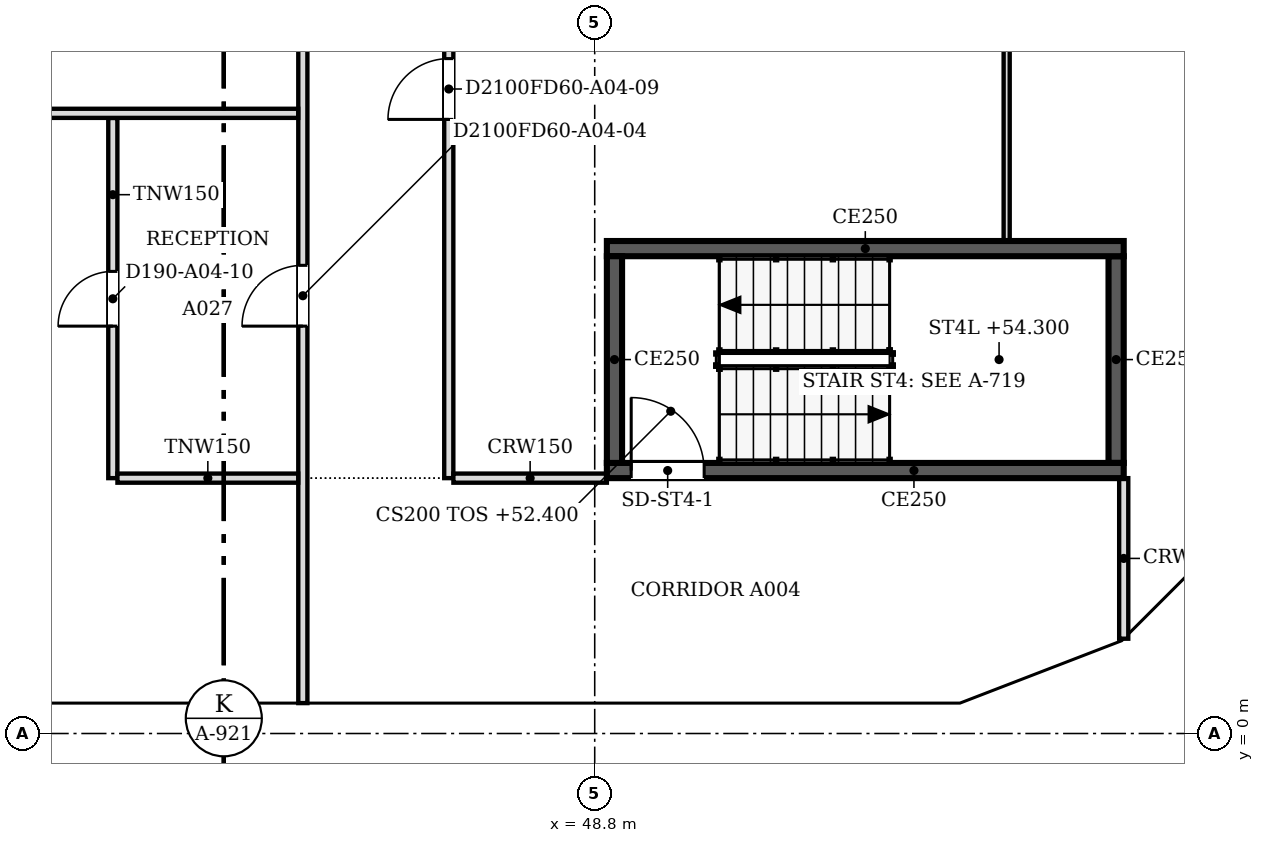
"""IFC4 building model, lengths in metres.
Left out: names, types, materials, properties, quantities, classifications, styles, units other than length and angle.
Written with IfcOpenShell. Run it as: python <this file> out.ifc"""

import sys

from ifc_helpers import new_model, si_unit, direction, frame, frame_2d, origin, place, context, subcontext, project, spatial, polyline, rectangle, outline, extrude, faceted_brep, source, transform, mapped, element, fill, save


model = new_model("IFC4")
c1 = context("Model", 3, precision=1e-05, world=origin(), true_north=direction((0.0, 1.0)))
c2 = subcontext(c1, "Body", "Model", "MODEL_VIEW")
j1 = project(units=[si_unit("LENGTHUNIT", "METRE"), si_unit("PLANEANGLEUNIT", "RADIAN")], contexts=[c1])
p1 = place(None, origin())
s1 = spatial("IfcSite", under=j1, at=p1, CompositionType="ELEMENT")
p2 = place(p1, origin())
s2 = spatial("IfcBuilding", under=s1, at=p2, CompositionType="ELEMENT")
p3 = place(p2, frame((0.0, 0.0, 52.4)))
s3 = spatial("IfcBuildingStorey", under=s2, at=p3, CompositionType="ELEMENT", Elevation=52.4)
m1 = source(origin(), c2, "Body", "Brep", [
    faceted_brep([(3.05, -0.25, 0.0), (6.1, -0.25, 3.8), (6.1, -0.25, 3.8), (3.05, -0.25, 7.6), (0.0, -0.25, 3.8), (0.0, 0.25, 3.8), (3.05, 0.25, 7.6), (6.1, 0.25, 3.8), (6.1, 0.25, 3.8), (3.05, 0.25, 0.0)], [[[0, 1, 2, 3, 4]], [[5, 6, 7, 8, 9]], [[9, 8, 1, 0]], [[7, 6, 3, 2]], [[6, 5, 4, 3]], [[5, 9, 0, 4]], [[1, 8, 7, 2]]]),
])
p4 = place(p3, frame((36.6, 0.25, -3.8), z_axis=(0.0, 0.0, 1.0), x_axis=(1.0, 0.0, 0.0)))
e1 = element("IfcWall", 1, at=p4, inside=s3, PredefinedType="SOLIDWALL", context=c2, shape_type="MappedRepresentation", body=[
    mapped(m1, transform((0.0, 0.0, 0.0), scale=1.0)),
])
m2 = source(origin(), c2, "Body", "SweptSolid", [
    extrude(outline(polyline([(3.05, 0.399), (5.78, 3.8), (3.05, 7.2), (0.321, 3.8), (3.05, 0.399)])), frame((0.0, 0.26, 0.0), z_axis=(0.0, -1.0, 0.0), x_axis=(1.0, 0.0, 0.0)), (0.0, 0.0, 1.0), 0.52),
])
p5 = place(p4, origin())
e2 = element("IfcOpeningElement", 2, at=p5, cuts=e1, PredefinedType="OPENING", context=c2, shape_type="MappedRepresentation", body=[
    mapped(m2, transform((0.0, 0.0, 0.0), scale=1.0)),
])
m3 = source(origin(), c2, "Body", "SweptSolid", [
    extrude(outline(polyline([(3.05, 0.0), (6.1, 3.8), (3.05, 7.6), (0.0, 3.8), (3.05, 0.0)])), frame((0.0, 0.25, 0.0), z_axis=(0.0, -1.0, 0.0), x_axis=(1.0, 0.0, 0.0)), (0.0, 0.0, 1.0), 0.5),
])
p6 = place(p3, frame((42.7, 0.25, -3.8), z_axis=(0.0, 0.0, 1.0), x_axis=(1.0, 0.0, 0.0)))
e3 = element("IfcWall", 3, at=p6, inside=s3, PredefinedType="SOLIDWALL", context=c2, shape_type="MappedRepresentation", body=[
    mapped(m3, transform((0.0, 0.0, 0.0), scale=1.0)),
])
p7 = place(p6, origin())
e4 = element("IfcOpeningElement", 4, at=p7, cuts=e3, PredefinedType="OPENING", context=c2, shape_type="MappedRepresentation", body=[
    mapped(m2, transform((0.0, 0.0, 0.0), scale=1.0)),
])
m4 = source(origin(), c2, "Body", "Brep", [
    faceted_brep([(3.05, -0.25, 0.0), (6.053, -0.25, 3.8), (3.05, -0.25, 7.6), (0.0, -0.25, 3.8), (0.0, 0.25, 3.8), (3.05, 0.25, 7.6), (6.007, 0.25, 3.859), (6.007, 0.25, 3.741), (3.05, 0.25, 0.0), (6.053, 0.0, 3.8)], [[[0, 1, 2, 3]], [[4, 5, 6, 7, 8]], [[8, 7, 9, 1, 0]], [[6, 5, 2, 1, 9]], [[5, 4, 3, 2]], [[4, 8, 0, 3]], [[9, 7, 6]]]),
])
p8 = place(p3, frame((48.8, 0.25, -3.8), z_axis=(0.0, 0.0, 1.0), x_axis=(1.0, 0.0, 0.0)))
e5 = element("IfcWall", 5, at=p8, inside=s3, PredefinedType="SOLIDWALL", context=c2, shape_type="MappedRepresentation", body=[
    mapped(m4, transform((0.0, 0.0, 0.0), scale=1.0)),
])
m5 = source(origin(), c2, "Body", "SweptSolid", [
    extrude(outline(polyline([(3.049, 0.401), (5.735, 3.8), (3.049, 7.199), (0.321, 3.8), (3.049, 0.401)])), frame((0.0, 0.26, 0.0), z_axis=(0.0, -1.0, 0.0), x_axis=(1.0, 0.0, 0.0)), (0.0, 0.0, 1.0), 0.52),
])
p9 = place(p8, origin())
e6 = element("IfcOpeningElement", 6, at=p9, cuts=e5, PredefinedType="OPENING", context=c2, shape_type="MappedRepresentation", body=[
    mapped(m5, transform((0.0, 0.0, 0.0), scale=1.0)),
])
m6 = source(origin(), c2, "Body", "Brep", [
    faceted_brep([(2.95, -0.25, 0.0), (3.003, -0.25, 0.068), (3.003, -0.25, 7.531), (2.95, -0.25, 7.6), (0.0, -0.25, 3.8), (0.047, 0.25, 3.86), (2.898, 0.25, 7.532), (2.898, 0.25, 0.068), (0.047, 0.25, 3.74), (2.95, 0.0, 0.0), (2.95, 0.0, 7.6), (0.0, 0.0, 3.8)], [[[0, 1, 2, 3, 4]], [[5, 6, 7, 8]], [[1, 0, 9]], [[10, 3, 2]], [[6, 5, 11, 4, 3, 10]], [[8, 7, 9, 0, 4, 11]], [[8, 11, 5]], [[1, 9, 7, 6, 10, 2]]]),
])
p10 = place(p3, frame((54.854, 0.25, -3.8), z_axis=(0.0, 0.0, 1.0), x_axis=(0.932970071518, 0.359953949349, 0.0)))
e7 = element("IfcWall", 7, at=p10, inside=s3, PredefinedType="SOLIDWALL", context=c2, shape_type="MappedRepresentation", body=[
    mapped(m6, transform((0.0, 0.0, 0.0), scale=1.0)),
])
m7 = source(origin(), c2, "Body", "SweptSolid", [
    extrude(outline(polyline([(2.75, 6.935), (0.316, 3.8), (2.75, 0.665), (2.75, 6.935)])), frame((0.0, 0.26, 0.0), z_axis=(0.0, -1.0, 0.0), x_axis=(1.0, 0.0, 0.0)), (0.0, 0.0, 1.0), 0.52),
])
p11 = place(p10, origin())
e8 = element("IfcOpeningElement", 8, at=p11, cuts=e7, PredefinedType="OPENING", context=c2, shape_type="MappedRepresentation", body=[
    mapped(m7, transform((0.0, 0.0, 0.0), scale=1.0)),
])
m8 = source(origin(), c2, "Body", "Brep", [
    faceted_brep([(0.053, -0.25, 0.0), (2.997, -0.25, 3.8), (0.053, -0.25, 7.6), (0.0, -0.25, 7.532), (0.0, -0.25, 0.068), (0.106, 0.25, 7.531), (2.944, 0.25, 3.868), (2.944, 0.25, 3.732), (0.106, 0.25, 0.068), (2.997, 0.0, 3.8), (0.053, 0.0, 0.0), (0.053, 0.0, 7.6)], [[[0, 1, 2, 3, 4]], [[5, 6, 7, 8]], [[8, 7, 9, 1, 0, 10]], [[6, 5, 11, 2, 1, 9]], [[3, 2, 11]], [[10, 0, 4]], [[8, 10, 4, 3, 11, 5]], [[9, 7, 6]]]),
])
p12 = place(p3, frame((57.569, 1.274, -3.8), z_axis=(0.0, 0.0, 1.0), x_axis=(0.707066050402, 0.707147509625, 0.0)))
e9 = element("IfcWall", 9, at=p12, inside=s3, PredefinedType="SOLIDWALL", context=c2, shape_type="MappedRepresentation", body=[
    mapped(m8, transform((0.0, 0.0, 0.0), scale=1.0)),
])
m9 = source(origin(), c2, "Body", "SweptSolid", [
    extrude(outline(polyline([(0.253, 0.666), (2.681, 3.8), (0.253, 6.934), (0.253, 0.666)])), frame((0.0, 0.26, 0.0), z_axis=(0.0, -1.0, 0.0), x_axis=(1.0, 0.0, 0.0)), (0.0, 0.0, 1.0), 0.52),
])
p13 = place(p12, origin())
e10 = element("IfcOpeningElement", 10, at=p13, cuts=e9, PredefinedType="OPENING", context=c2, shape_type="MappedRepresentation", body=[
    mapped(m9, transform((0.0, 0.0, 0.0), scale=1.0)),
])
p14 = place(p2, frame((0.0, 0.0, 56.2)))
s4 = spatial("IfcBuildingStorey", under=s2, at=p14, CompositionType="ELEMENT", Elevation=56.2)
m10 = source(origin(), c2, "Body", "SweptSolid", [
    extrude(outline(polyline([(3.05, 0.0), (6.1, 3.8), (3.05, 7.6), (0.0, 3.8), (3.05, 0.0)])), frame((0.0, 0.25, 0.0), z_axis=(0.0, -1.0, 0.0), x_axis=(1.0, 0.0, 0.0)), (0.0, 0.0, 1.0), 0.5),
])
p15 = place(p14, frame((39.65, 0.25, -3.8), z_axis=(0.0, 0.0, 1.0), x_axis=(1.0, 0.0, 0.0)))
e11 = element("IfcWall", 11, at=p15, inside=s4, PredefinedType="SOLIDWALL", context=c2, shape_type="MappedRepresentation", body=[
    mapped(m10, transform((0.0, 0.0, 0.0), scale=1.0)),
])
m11 = source(origin(), c2, "Body", "SweptSolid", [
    extrude(outline(polyline([(3.05, 0.399), (5.78, 3.8), (3.05, 7.201), (0.321, 3.8), (3.05, 0.399)])), frame((0.0, 0.26, 0.0), z_axis=(0.0, -1.0, 0.0), x_axis=(1.0, 0.0, 0.0)), (0.0, 0.0, 1.0), 0.52),
])
p16 = place(p15, origin())
e12 = element("IfcOpeningElement", 12, at=p16, cuts=e11, PredefinedType="OPENING", context=c2, shape_type="MappedRepresentation", body=[
    mapped(m11, transform((0.0, 0.0, 0.0), scale=1.0)),
])
p17 = place(p14, frame((45.75, 0.25, -3.8), z_axis=(0.0, 0.0, 1.0), x_axis=(1.0, 0.0, 0.0)))
e13 = element("IfcWall", 13, at=p17, inside=s4, PredefinedType="SOLIDWALL", context=c2, shape_type="MappedRepresentation", body=[
    mapped(m10, transform((0.0, 0.0, 0.0), scale=1.0)),
])
p18 = place(p17, origin())
e14 = element("IfcOpeningElement", 14, at=p18, cuts=e13, PredefinedType="OPENING", context=c2, shape_type="MappedRepresentation", body=[
    mapped(m11, transform((0.0, 0.0, 0.0), scale=1.0)),
])
m12 = source(origin(), c2, "Body", "Brep", [
    faceted_brep([(3.003, -0.25, 0.0), (3.05, -0.25, 0.06), (3.05, -0.25, 7.54), (3.003, -0.25, 7.6), (0.0, -0.25, 3.8), (0.0, 0.25, 3.8), (2.957, 0.25, 7.541), (2.957, 0.25, 0.059), (3.003, 0.0, 0.0), (3.003, 0.0, 7.6)], [[[0, 1, 2, 3, 4]], [[5, 6, 7]], [[1, 0, 8]], [[9, 3, 2]], [[6, 5, 4, 3, 9]], [[5, 7, 8, 0, 4]], [[1, 8, 7, 6, 9, 2]]]),
])
p19 = place(p14, frame((51.85, 0.25, -3.8), z_axis=(0.0, 0.0, 1.0), x_axis=(1.0, 0.0, 0.0)))
e15 = element("IfcWall", 15, at=p19, inside=s4, PredefinedType="SOLIDWALL", context=c2, shape_type="MappedRepresentation", body=[
    mapped(m12, transform((0.0, 0.0, 0.0), scale=1.0)),
])
m13 = source(origin(), c2, "Body", "SweptSolid", [
    extrude(outline(polyline([(2.803, 6.944), (0.319, 3.8), (2.803, 0.656), (2.803, 6.944)])), frame((0.0, 0.26, 0.0), z_axis=(0.0, -1.0, 0.0), x_axis=(1.0, 0.0, 0.0)), (0.0, 0.0, 1.0), 0.52),
])
p20 = place(p19, origin())
e16 = element("IfcOpeningElement", 16, at=p20, cuts=e15, PredefinedType="OPENING", context=c2, shape_type="MappedRepresentation", body=[
    mapped(m13, transform((0.0, 0.0, 0.0), scale=1.0)),
])
m14 = source(origin(), c2, "Body", "Brep", [
    faceted_brep([(0.047, -0.25, 0.0), (2.997, -0.25, 3.8), (0.047, -0.25, 7.6), (0.0, -0.25, 7.541), (0.0, -0.25, 0.059), (0.093, 0.25, 7.54), (2.944, 0.25, 3.868), (2.944, 0.25, 3.732), (0.093, 0.25, 0.06), (2.997, 0.0, 3.8), (0.047, 0.0, 0.0), (0.047, 0.0, 7.6)], [[[0, 1, 2, 3, 4]], [[5, 6, 7, 8]], [[8, 7, 9, 1, 0, 10]], [[6, 5, 11, 2, 1, 9]], [[3, 2, 11]], [[10, 0, 4]], [[8, 10, 4, 3, 11, 5]], [[9, 7, 6]]]),
])
p21 = place(p14, frame((54.81, 0.233, -3.8), z_axis=(0.0, 0.0, 1.0), x_axis=(0.932990326376, 0.359901446078, 0.0)))
e17 = element("IfcWall", 17, at=p21, inside=s4, PredefinedType="SOLIDWALL", context=c2, shape_type="MappedRepresentation", body=[
    mapped(m14, transform((0.0, 0.0, 0.0), scale=1.0)),
])
m15 = source(origin(), c2, "Body", "SweptSolid", [
    extrude(outline(polyline([(0.247, 0.665), (2.681, 3.8), (0.247, 6.935), (0.247, 0.665)])), frame((0.0, 0.26, 0.0), z_axis=(0.0, -1.0, 0.0), x_axis=(1.0, 0.0, 0.0)), (0.0, 0.0, 1.0), 0.52),
])
p22 = place(p21, origin())
e18 = element("IfcOpeningElement", 18, at=p22, cuts=e17, PredefinedType="OPENING", context=c2, shape_type="MappedRepresentation", body=[
    mapped(m15, transform((0.0, 0.0, 0.0), scale=1.0)),
])
m16 = source(origin(), c2, "Body", "Brep", [
    faceted_brep([(2.944, -0.25, 0.0), (2.997, -0.25, 0.068), (2.997, -0.25, 7.532), (2.944, -0.25, 7.6), (0.0, -0.25, 3.8), (0.053, 0.25, 3.868), (2.891, 0.25, 7.532), (2.891, 0.25, 0.068), (0.053, 0.25, 3.732), (2.944, 0.0, 0.0), (2.944, 0.0, 7.6), (0.0, 0.0, 3.8)], [[[0, 1, 2, 3, 4]], [[5, 6, 7, 8]], [[1, 0, 9]], [[10, 3, 2]], [[6, 5, 11, 4, 3, 10]], [[8, 7, 9, 0, 4, 11]], [[8, 11, 5]], [[1, 9, 7, 6, 10, 2]]]),
])
p23 = place(p14, frame((57.606, 1.312, -3.8), z_axis=(0.0, 0.0, 1.0), x_axis=(0.707147509625, 0.707066050402, 0.0)))
e19 = element("IfcWall", 19, at=p23, inside=s4, PredefinedType="SOLIDWALL", context=c2, shape_type="MappedRepresentation", body=[
    mapped(m16, transform((0.0, 0.0, 0.0), scale=1.0)),
])
m17 = source(origin(), c2, "Body", "SweptSolid", [
    extrude(outline(polyline([(2.744, 6.934), (0.316, 3.8), (2.744, 0.667), (2.744, 6.934)])), frame((0.0, 0.26, 0.0), z_axis=(0.0, -1.0, 0.0), x_axis=(1.0, 0.0, 0.0)), (0.0, 0.0, 1.0), 0.52),
])
p24 = place(p23, origin())
e20 = element("IfcOpeningElement", 20, at=p24, cuts=e19, PredefinedType="OPENING", context=c2, shape_type="MappedRepresentation", body=[
    mapped(m17, transform((0.0, 0.0, 0.0), scale=1.0)),
])
p25 = place(p3, frame((57.5, 4.325, 0.0), z_axis=(0.0, 0.0, 1.0), x_axis=(-1.0, 0.0, 0.0)))
e21 = element("IfcWall", 21, at=p25, inside=s3, PredefinedType="SOLIDWALL", context=c2, shape_type="SweptSolid", body=[
    extrude(rectangle(XDim=8.5, YDim=0.25, at=frame_2d((4.25, 0.0))), origin(), (0.0, 0.0, 1.0), 3.8),
])
m18 = source(origin(), c2, "Body", "SweptSolid", [
    extrude(rectangle(XDim=1.2, YDim=2.1, at=frame_2d((0.6, 1.05))), frame((0.0, 0.135, 0.0), z_axis=(0.0, -1.0, 0.0), x_axis=(1.0, 0.0, 0.0)), (0.0, 0.0, 1.0), 0.27),
])
p26 = place(p25, frame((6.9, 0.0, 0.0)))
e22 = element("IfcOpeningElement", 22, at=p26, cuts=e21, PredefinedType="OPENING", context=c2, shape_type="MappedRepresentation", body=[
    mapped(m18, transform((0.0, 0.0, 0.0), scale=1.0)),
])
p27 = place(p3, frame((49.125, 4.45, 0.0), z_axis=(0.0, 0.0, 1.0), x_axis=(0.0, 1.0, 0.0)))
e23 = element("IfcWall", 23, at=p27, inside=s3, PredefinedType="SOLIDWALL", context=c2, shape_type="SweptSolid", body=[
    extrude(rectangle(XDim=3.4, YDim=0.25, at=frame_2d((1.7, 0.0))), origin(), (0.0, 0.0, 1.0), 3.8),
])
p28 = place(p3, frame((49.0, 7.975, 0.0), z_axis=(0.0, 0.0, 1.0), x_axis=(1.0, 0.0, 0.0)))
e24 = element("IfcWall", 24, at=p28, inside=s3, PredefinedType="SOLIDWALL", context=c2, shape_type="SweptSolid", body=[
    extrude(rectangle(XDim=8.5, YDim=0.25, at=frame_2d((4.25, 0.0))), origin(), (0.0, 0.0, 1.0), 3.8),
])
p29 = place(p3, frame((57.375, 7.85, 0.0), z_axis=(0.0, 0.0, 1.0), x_axis=(0.0, -1.0, 0.0)))
e25 = element("IfcWall", 25, at=p29, inside=s3, PredefinedType="SOLIDWALL", context=c2, shape_type="SweptSolid", body=[
    extrude(rectangle(XDim=3.4, YDim=0.25, at=frame_2d((1.7, 0.0))), origin(), (0.0, 0.0, 1.0), 3.8),
])
p30 = place(p3, frame((44.0, 0.5, 0.0), z_axis=(0.0, 0.0, 1.0), x_axis=(0.0, 1.0, 0.0)))
e26 = element("IfcWall", 26, at=p30, inside=s3, PredefinedType="PARTITIONING", context=c2, shape_type="SweptSolid", body=[
    extrude(rectangle(XDim=21.424, YDim=0.15, at=frame_2d((10.712, 0.0))), origin(), (0.0, 0.0, 1.0), 3.067),
])
m19 = source(origin(), c2, "Body", "SweptSolid", [
    extrude(rectangle(XDim=1.0, YDim=2.1, at=frame_2d((0.5, 1.05))), frame((0.0, 0.085, 0.0), z_axis=(0.0, -1.0, 0.0), x_axis=(1.0, 0.0, 0.0)), (0.0, 0.0, 1.0), 0.17),
])
p31 = place(p30, frame((6.2, 0.0, 0.0)))
e27 = element("IfcOpeningElement", 27, at=p31, cuts=e26, PredefinedType="OPENING", context=c2, shape_type="MappedRepresentation", body=[
    mapped(m19, transform((0.0, 0.0, 0.0), scale=1.0)),
])
m20 = source(origin(), c2, "Body", "SweptSolid", [
    extrude(rectangle(XDim=0.9, YDim=2.1, at=frame_2d((0.45, 1.05))), frame((0.0, 0.085, 0.0), z_axis=(0.0, -1.0, 0.0), x_axis=(1.0, 0.0, 0.0)), (0.0, 0.0, 1.0), 0.17),
])
p32 = place(p30, frame((15.1, 0.0, 0.0)))
e28 = element("IfcOpeningElement", 28, at=p32, cuts=e26, PredefinedType="OPENING", context=c2, shape_type="MappedRepresentation", body=[
    mapped(m20, transform((0.0, 0.0, 0.0), scale=1.0)),
])
p33 = place(p3, frame((57.5, 1.559, 0.0), z_axis=(0.0, 0.0, 1.0), x_axis=(0.0, 1.0, 0.0)))
e29 = element("IfcWall", 29, at=p33, inside=s3, PredefinedType="PARTITIONING", context=c2, shape_type="SweptSolid", body=[
    extrude(rectangle(XDim=2.641, YDim=0.15, at=frame_2d((1.32, 0.0))), origin(), (0.0, 0.0, 1.0), 3.067),
])
p34 = place(p3, frame((40.875, 4.2, 0.0), z_axis=(0.0, 0.0, 1.0), x_axis=(0.0, 1.0, 0.0)))
e30 = element("IfcWall", 30, at=p34, inside=s3, PredefinedType="PARTITIONING", context=c2, shape_type="SweptSolid", body=[
    extrude(rectangle(XDim=5.924, YDim=0.15, at=frame_2d((2.962, 0.0))), origin(), (0.0, 0.0, 1.0), 3.067),
])
p35 = place(p34, frame((2.5, 0.0, 0.0)))
e31 = element("IfcOpeningElement", 31, at=p35, cuts=e30, PredefinedType="OPENING", context=c2, shape_type="MappedRepresentation", body=[
    mapped(m20, transform((0.0, 0.0, 0.0), scale=1.0)),
])
p36 = place(p3, frame((40.951, 4.2, 0.0), z_axis=(0.0, 0.0, 1.0), x_axis=(1.0, 0.0, 0.0)))
e32 = element("IfcWall", 32, at=p36, inside=s3, PredefinedType="PARTITIONING", context=c2, shape_type="SweptSolid", body=[
    extrude(rectangle(XDim=2.973, YDim=0.15, at=frame_2d((1.487, 0.0))), origin(), (0.0, 0.0, 1.0), 3.067),
])
p37 = place(p3, frame((46.4, 21.924, 0.0), z_axis=(0.0, 0.0, 1.0), x_axis=(0.0, -1.0, 0.0)))
e33 = element("IfcWall", 33, at=p37, inside=s3, PredefinedType="PARTITIONING", context=c2, shape_type="SweptSolid", body=[
    extrude(rectangle(XDim=17.724, YDim=0.15, at=frame_2d((8.862, 0.0))), origin(), (0.0, 0.0, 1.0), 3.067),
])
p38 = place(p37, frame((1.923, 0.0, 0.0)))
e34 = element("IfcOpeningElement", 34, at=p38, cuts=e33, PredefinedType="OPENING", context=c2, shape_type="MappedRepresentation", body=[
    mapped(m19, transform((0.0, 0.0, 0.0), scale=1.0)),
])
p39 = place(p37, frame((10.824, 0.0, 0.0)))
e35 = element("IfcOpeningElement", 35, at=p39, cuts=e33, PredefinedType="OPENING", context=c2, shape_type="MappedRepresentation", body=[
    mapped(m19, transform((0.0, 0.0, 0.0), scale=1.0)),
])
p40 = place(p3, frame((46.476, 4.2, 0.0), z_axis=(0.0, 0.0, 1.0), x_axis=(1.0, 0.0, 0.0)))
e36 = element("IfcWall", 36, at=p40, inside=s3, PredefinedType="PARTITIONING", context=c2, shape_type="SweptSolid", body=[
    extrude(rectangle(XDim=2.524, YDim=0.15, at=frame_2d((1.262, 0.0))), origin(), (0.0, 0.0, 1.0), 3.067),
])
p41 = place(p3, frame((55.575, 17.024, 0.0), z_axis=(0.0, 0.0, 1.0), x_axis=(0.0, -1.0, 0.0)))
e37 = element("IfcWall", 37, at=p41, inside=s3, PredefinedType="PARTITIONING", context=c2, shape_type="SweptSolid", body=[
    extrude(rectangle(XDim=8.924, YDim=0.1, at=frame_2d((4.462, 0.0))), origin(), (0.0, 0.0, 1.0), 3.067),
])
m21 = source(origin(), c2, "Body", "SweptSolid", [
    extrude(rectangle(XDim=0.9, YDim=2.1, at=frame_2d((0.45, 1.05))), frame((0.0, 0.06, 0.0), z_axis=(0.0, -1.0, 0.0), x_axis=(1.0, 0.0, 0.0)), (0.0, 0.0, 1.0), 0.12),
])
p42 = place(p41, frame((4.024, 0.0, 0.0)))
e38 = element("IfcOpeningElement", 38, at=p42, cuts=e37, PredefinedType="OPENING", context=c2, shape_type="MappedRepresentation", body=[
    mapped(m21, transform((0.0, 0.0, 0.0), scale=1.0)),
])
p43 = place(p3, frame((27.5, 10.2, 0.0), z_axis=(0.0, 0.0, 1.0), x_axis=(1.0, 0.0, 0.0)))
e39 = element("IfcWall", 39, at=p43, inside=s3, PredefinedType="PARTITIONING", context=c2, shape_type="SweptSolid", body=[
    extrude(rectangle(XDim=16.424, YDim=0.15, at=frame_2d((8.212, 0.0))), origin(), (0.0, 0.0, 1.0), 3.067),
])
m22 = source(origin(), c2, "Body", "SweptSolid", [
    extrude(rectangle(XDim=1.2, YDim=2.1, at=frame_2d((0.6, 1.05))), frame((0.0, 0.025, 0.0), z_axis=(0.0, -1.0, 0.0), x_axis=(1.0, 0.0, 0.0)), (0.0, 0.0, 1.0), 0.05),
])
p44 = place(p26, origin())
e40 = element("IfcDoor", 40, at=p44, inside=s3, OperationType="SINGLE_SWING_RIGHT", PredefinedType="DOOR", context=c2, shape_type="MappedRepresentation", body=[
    mapped(m22, transform((0.0, 0.0, 0.0), scale=1.0)),
])
fill(e22, e40)
m23 = source(origin(), c2, "Body", "SweptSolid", [
    extrude(rectangle(XDim=1.0, YDim=2.1, at=frame_2d((0.5, 1.05))), frame((0.0, 0.025, 0.0), z_axis=(0.0, -1.0, 0.0), x_axis=(1.0, 0.0, 0.0)), (0.0, 0.0, 1.0), 0.05),
])
p45 = place(p31, origin())
e41 = element("IfcDoor", 41, at=p45, inside=s3, OperationType="SINGLE_SWING_LEFT", PredefinedType="DOOR", context=c2, shape_type="MappedRepresentation", body=[
    mapped(m23, transform((0.0, 0.0, 0.0), scale=1.0)),
])
fill(e27, e41)
m24 = source(origin(), c2, "Body", "SweptSolid", [
    extrude(rectangle(XDim=0.9, YDim=2.1, at=frame_2d((0.45, 1.05))), frame((0.0, 0.025, 0.0), z_axis=(0.0, -1.0, 0.0), x_axis=(1.0, 0.0, 0.0)), (0.0, 0.0, 1.0), 0.05),
])
p46 = place(p35, origin())
e42 = element("IfcDoor", 42, at=p46, inside=s3, OperationType="SINGLE_SWING_LEFT", PredefinedType="DOOR", context=c2, shape_type="MappedRepresentation", body=[
    mapped(m24, transform((0.0, 0.0, 0.0), scale=1.0)),
])
fill(e31, e42)
p47 = place(p39, origin())
e43 = element("IfcDoor", 43, at=p47, inside=s3, OperationType="SINGLE_SWING_RIGHT", PredefinedType="DOOR", context=c2, shape_type="MappedRepresentation", body=[
    mapped(m23, transform((0.0, 0.0, 0.0), scale=1.0)),
])
fill(e35, e43)
save(model, sys.argv[1])
